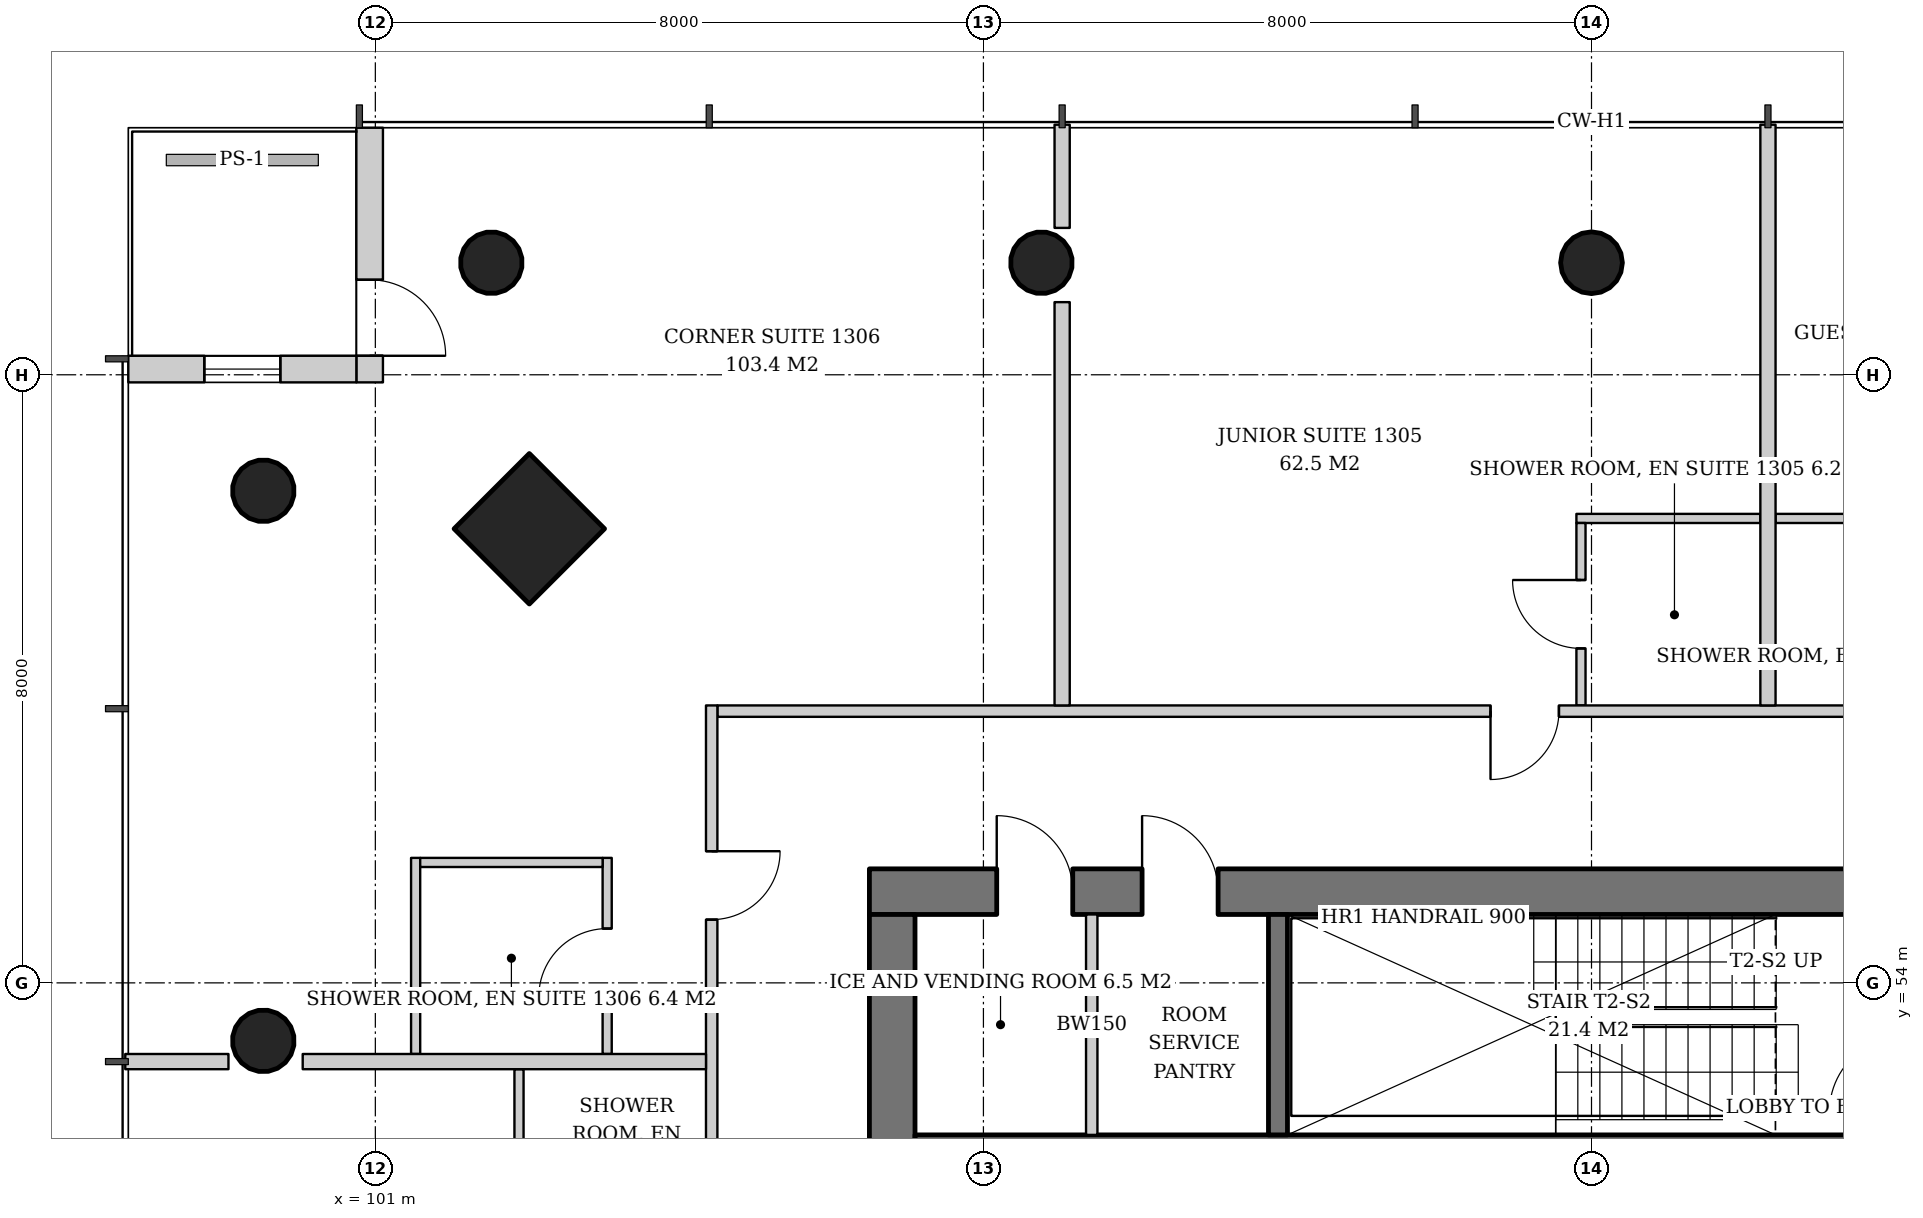
"""IFC4 building model, lengths in metres.
Left out: names, types, materials, properties, quantities, classifications, styles, units other than length and angle.
Written with IfcOpenShell. Run it as: python <this file> out.ifc"""

import sys

from ifc_helpers import new_model, si_unit, direction, frame, frame_2d, origin, origin_2d, place, context, subcontext, project, spatial, rectangle, hollow_circle, extrude, element, fill, save


model = new_model("IFC4")
c1 = context("Model", 3, precision=1e-05, world=origin(), true_north=direction((0.0, 1.0)))
c2 = subcontext(c1, "Body", "Model", "MODEL_VIEW")
j1 = project(units=[si_unit("LENGTHUNIT", "METRE"), si_unit("PLANEANGLEUNIT", "RADIAN")], contexts=[c1])
p1 = place(None, origin())
s1 = spatial("IfcSite", under=j1, at=p1, CompositionType="ELEMENT")
p2 = place(p1, origin())
s2 = spatial("IfcBuilding", under=s1, at=p2, CompositionType="ELEMENT")
p3 = place(p2, frame((0.0, 0.0, 55.2)))
s3 = spatial("IfcBuildingStorey", under=s2, at=p3, CompositionType="ELEMENT", Elevation=55.2)
p4 = place(p3, frame((102.974, 60.026, 0.0), z_axis=(0.043029647111, -0.043029647111, 0.998146732169), x_axis=(0.707106781187, 0.707106781187, 0.0)))
e1 = element("IfcColumn", 1, at=p4, inside=s3, PredefinedType="COLUMN", context=c2, shape_type="SweptSolid", body=[
    extrude(rectangle(XDim=1.4, YDim=1.4, at=origin_2d()), origin(), (0.0, 0.0, 1.0), 3.807),
])
p5 = place(p3, frame((102.474, 63.526, 0.0), z_axis=(0.043029647111, -0.043029647111, 0.998146732169), x_axis=(0.707106781187, 0.707106781187, 0.0)))
e2 = element("IfcColumn", 2, at=p5, inside=s3, PredefinedType="COLUMN", context=c2, shape_type="SweptSolid", body=[
    extrude(hollow_circle(Radius=0.406, WallThickness=0.03, at=origin_2d()), origin(), (0.0, 0.0, 1.0), 3.807),
])
p6 = place(p3, frame((117.0, 63.526, 0.0), z_axis=(0.0, -0.043069538298, 0.999072076915), x_axis=(1.0, 0.0, 0.0)))
e3 = element("IfcColumn", 3, at=p6, inside=s3, PredefinedType="COLUMN", context=c2, shape_type="SweptSolid", body=[
    extrude(hollow_circle(Radius=0.406, WallThickness=0.03, at=origin_2d()), origin(), (0.0, 0.0, 1.0), 3.803),
])
p7 = place(p3, frame((109.737, 63.526, 0.0), z_axis=(0.021497706284, -0.043059584825, 0.998841188968), x_axis=(0.894693706707, 0.446680166538, 0.0)))
e4 = element("IfcColumn", 4, at=p7, inside=s3, PredefinedType="COLUMN", context=c2, shape_type="SweptSolid", body=[
    extrude(hollow_circle(Radius=0.406, WallThickness=0.03, at=origin_2d()), origin(), (0.0, 0.0, 1.0), 3.804),
])
p8 = place(p3, frame((99.474, 60.526, 0.0), z_axis=(0.043029647111, -0.043029647111, 0.998146732169), x_axis=(0.707106781187, 0.707106781187, 0.0)))
e5 = element("IfcColumn", 5, at=p8, inside=s3, PredefinedType="COLUMN", context=c2, shape_type="SweptSolid", body=[
    extrude(hollow_circle(Radius=0.406, WallThickness=0.03, at=origin_2d()), origin(), (0.0, 0.0, 1.0), 3.807),
])
p9 = place(p3, frame((99.474, 53.263, 0.0), z_axis=(0.043059584825, -0.021497706284, 0.998841188968), x_axis=(0.446680166538, 0.894693706707, 0.0)))
e6 = element("IfcColumn", 6, at=p9, inside=s3, PredefinedType="COLUMN", context=c2, shape_type="SweptSolid", body=[
    extrude(hollow_circle(Radius=0.406, WallThickness=0.03, at=origin_2d()), origin(), (0.0, 0.0, 1.0), 3.804),
])
p10 = place(p3, frame((107.5, 55.2, 0.0), z_axis=(0.0, 0.0, 1.0), x_axis=(1.0, 0.0, 0.0)))
e7 = element("IfcWall", 7, at=p10, inside=s3, PredefinedType="SHEAR", context=c2, shape_type="SweptSolid", body=[
    extrude(rectangle(XDim=19.0, YDim=0.6, at=frame_2d((9.5, 0.0))), origin(), (0.0, 0.0, 1.0), 3.8),
])
p11 = place(p10, frame((14.14, 0.0, 0.0)))
e8 = element("IfcOpeningElement", 8, at=p11, cuts=e7, PredefinedType="OPENING", context=c2, shape_type="SweptSolid", body=[
    extrude(rectangle(XDim=1.0, YDim=2.1, at=frame_2d((0.5, 1.05))), frame((0.0, 0.31, 0.0), z_axis=(0.0, -1.0, 0.0), x_axis=(1.0, 0.0, 0.0)), (0.0, 0.0, 1.0), 0.62),
])
p12 = place(p10, frame((1.675, 0.0, 0.0)))
e9 = element("IfcOpeningElement", 9, at=p12, cuts=e7, PredefinedType="OPENING", context=c2, shape_type="SweptSolid", body=[
    extrude(rectangle(XDim=1.0, YDim=2.1, at=frame_2d((0.5, 1.05))), frame((0.0, 0.31, 0.0), z_axis=(0.0, -1.0, 0.0), x_axis=(1.0, 0.0, 0.0)), (0.0, 0.0, 1.0), 0.62),
])
p13 = place(p10, frame((3.587, 0.0, 0.0)))
e10 = element("IfcOpeningElement", 10, at=p13, cuts=e7, PredefinedType="OPENING", context=c2, shape_type="SweptSolid", body=[
    extrude(rectangle(XDim=1.0, YDim=2.1, at=frame_2d((0.5, 1.05))), frame((0.0, 0.31, 0.0), z_axis=(0.0, -1.0, 0.0), x_axis=(1.0, 0.0, 0.0)), (0.0, 0.0, 1.0), 0.62),
])
p14 = place(p3, frame((107.8, 37.1, 0.0), z_axis=(0.0, 0.0, 1.0), x_axis=(0.0, 1.0, 0.0)))
e11 = element("IfcWall", 11, at=p14, inside=s3, PredefinedType="SHEAR", context=c2, shape_type="SweptSolid", body=[
    extrude(rectangle(XDim=17.8, YDim=0.6, at=frame_2d((8.9, 0.0))), origin(), (0.0, 0.0, 1.0), 3.8),
])
p15 = place(p14, frame((8.0, 0.0, 0.0)))
e12 = element("IfcOpeningElement", 12, at=p15, cuts=e11, PredefinedType="OPENING", context=c2, shape_type="SweptSolid", body=[
    extrude(rectangle(XDim=1.8, YDim=2.4, at=frame_2d((0.9, 1.2))), frame((0.0, 0.31, 0.0), z_axis=(0.0, -1.0, 0.0), x_axis=(1.0, 0.0, 0.0)), (0.0, 0.0, 1.0), 0.62),
])
p16 = place(p3, frame((108.1, 51.8, 0.0), z_axis=(0.0, 0.0, 1.0), x_axis=(1.0, 0.0, 0.0)))
e13 = element("IfcWall", 13, at=p16, inside=s3, PredefinedType="SHEAR", context=c2, shape_type="SweptSolid", body=[
    extrude(rectangle(XDim=17.8, YDim=0.4, at=frame_2d((8.9, 0.0))), origin(), (0.0, 0.0, 1.0), 3.8),
])
p17 = place(p3, frame((100.925, 65.25, 0.0), z_axis=(0.0, 0.0, 1.0), x_axis=(0.0, -1.0, 0.0)))
e14 = element("IfcWall", 14, at=p17, inside=s3, PredefinedType="SOLIDWALL", context=c2, shape_type="SweptSolid", body=[
    extrude(rectangle(XDim=3.35, YDim=0.35, at=frame_2d((1.675, 0.0))), origin(), (0.0, 0.0, 1.0), 3.6),
])
p18 = place(p17, frame((2.0, 0.0, 0.0)))
e15 = element("IfcOpeningElement", 15, at=p18, cuts=e14, PredefinedType="OPENING", context=c2, shape_type="SweptSolid", body=[
    extrude(rectangle(XDim=1.0, YDim=2.4, at=frame_2d((0.5, 1.2))), frame((0.0, 0.185, 0.0), z_axis=(0.0, -1.0, 0.0), x_axis=(1.0, 0.0, 0.0)), (0.0, 0.0, 1.0), 0.37),
])
p19 = place(p3, frame((100.75, 62.075, 0.0), z_axis=(0.0, 0.0, 1.0), x_axis=(-1.0, 0.0, 0.0)))
e16 = element("IfcWall", 16, at=p19, inside=s3, PredefinedType="SOLIDWALL", context=c2, shape_type="SweptSolid", body=[
    extrude(rectangle(XDim=3.0, YDim=0.35, at=frame_2d((1.5, 0.0))), origin(), (0.0, 0.0, 1.0), 3.6),
])
p20 = place(p19, frame((1.0, 0.0, 0.9)))
e17 = element("IfcOpeningElement", 17, at=p20, cuts=e16, PredefinedType="OPENING", context=c2, shape_type="SweptSolid", body=[
    extrude(rectangle(XDim=1.0, YDim=2.4, at=frame_2d((0.5, 1.2))), frame((0.0, 0.185, 0.0), z_axis=(0.0, -1.0, 0.0), x_axis=(1.0, 0.0, 0.0)), (0.0, 0.0, 1.0), 0.37),
])
p21 = place(p3, frame((112.875, 52.0, 0.0), z_axis=(0.0, 0.0, 1.0), x_axis=(0.0, 1.0, 0.0)))
e18 = element("IfcWall", 18, at=p21, inside=s3, PredefinedType="SHEAR", context=c2, shape_type="SweptSolid", body=[
    extrude(rectangle(XDim=2.9, YDim=0.25, at=frame_2d((1.45, 0.0))), origin(), (0.0, 0.0, 1.0), 3.8),
])
p22 = place(p3, frame((110.425, 52.0, 0.0), z_axis=(0.0, 0.0, 1.0), x_axis=(0.0, 1.0, 0.0)))
e19 = element("IfcWall", 19, at=p22, inside=s3, PredefinedType="SOLIDWALL", context=c2, shape_type="SweptSolid", body=[
    extrude(rectangle(XDim=2.9, YDim=0.15, at=frame_2d((1.45, 0.0))), origin(), (0.0, 0.0, 1.0), 3.6),
])
for number, where, z_axis, x_axis in (
    (20, (121.841, 60.11, 0.0), (0.0, 0.0, 1.0), (-1.0, 0.0, 0.0)),
    (21, (119.221, 60.11, 0.0), (0.0, 0.0, 1.0), (-1.0, 0.0, 0.0)),
):
    element("IfcWall", number, at=place(p3, frame(where, z_axis=z_axis, x_axis=x_axis)), inside=s3, PredefinedType="PARTITIONING", context=c2, shape_type="SweptSolid", body=[
        extrude(rectangle(XDim=2.42, YDim=0.12, at=frame_2d((1.21, 0.0))), origin(), (0.0, 0.0, 1.0), 2.847),
    ])
p23 = place(p3, frame((116.861, 57.65, 0.0), z_axis=(0.0, 0.0, 1.0), x_axis=(0.0, 1.0, 0.0)))
e22 = element("IfcWall", 22, at=p23, inside=s3, PredefinedType="PARTITIONING", context=c2, shape_type="SweptSolid", body=[
    extrude(rectangle(XDim=2.4, YDim=0.12, at=frame_2d((1.2, 0.0))), origin(), (0.0, 0.0, 1.0), 3.6),
])
p24 = place(p23, frame((0.75, 0.0, 0.0)))
e23 = element("IfcOpeningElement", 23, at=p24, cuts=e22, PredefinedType="OPENING", context=c2, shape_type="SweptSolid", body=[
    extrude(rectangle(XDim=0.9, YDim=2.1, at=frame_2d((0.45, 1.05))), frame((0.0, 0.07, 0.0), z_axis=(0.0, -1.0, 0.0), x_axis=(1.0, 0.0, 0.0)), (0.0, 0.0, 1.0), 0.14),
])
p25 = place(p3, frame((128.65, 57.575, 0.0), z_axis=(0.0, 0.0, 1.0), x_axis=(-1.0, 0.0, 0.0)))
e24 = element("IfcWall", 24, at=p25, inside=s3, PredefinedType="PARTITIONING", context=c2, shape_type="SweptSolid", body=[
    extrude(rectangle(XDim=23.15, YDim=0.15, at=frame_2d((11.575, 0.0))), origin(), (0.0, 0.0, 1.0), 2.8),
])
p26 = place(p25, frame((1.918, 0.0, 0.0)))
e25 = element("IfcOpeningElement", 25, at=p26, cuts=e24, PredefinedType="OPENING", context=c2, shape_type="SweptSolid", body=[
    extrude(rectangle(XDim=0.9, YDim=2.1, at=frame_2d((0.45, 1.05))), frame((0.0, 0.085, 0.0), z_axis=(0.0, -1.0, 0.0), x_axis=(1.0, 0.0, 0.0)), (0.0, 0.0, 1.0), 0.17),
])
p27 = place(p25, frame((5.678, 0.0, 0.0)))
e26 = element("IfcOpeningElement", 26, at=p27, cuts=e24, PredefinedType="OPENING", context=c2, shape_type="SweptSolid", body=[
    extrude(rectangle(XDim=0.9, YDim=2.1, at=frame_2d((0.45, 1.05))), frame((0.0, 0.085, 0.0), z_axis=(0.0, -1.0, 0.0), x_axis=(1.0, 0.0, 0.0)), (0.0, 0.0, 1.0), 0.17),
])
p28 = place(p25, frame((12.079, 0.0, 0.0)))
e27 = element("IfcOpeningElement", 27, at=p28, cuts=e24, PredefinedType="OPENING", context=c2, shape_type="SweptSolid", body=[
    extrude(rectangle(XDim=0.9, YDim=2.1, at=frame_2d((0.45, 1.05))), frame((0.0, 0.085, 0.0), z_axis=(0.0, -1.0, 0.0), x_axis=(1.0, 0.0, 0.0)), (0.0, 0.0, 1.0), 0.17),
])
p29 = place(p3, frame((119.322, 57.65, 0.0), z_axis=(0.0, 0.0, 1.0), x_axis=(0.0, 1.0, 0.0)))
e28 = element("IfcWall", 28, at=p29, inside=s3, PredefinedType="PARTITIONING", context=c2, shape_type="SweptSolid", body=[
    extrude(rectangle(XDim=7.64, YDim=0.2, at=frame_2d((3.82, 0.0))), origin(), (0.0, 0.0, 1.0), 3.05),
])
p30 = place(p3, frame((110.036, 57.65, 0.0), z_axis=(0.0, 0.0, 1.0), x_axis=(0.0, 1.0, 0.0)))
e29 = element("IfcWall", 29, at=p30, inside=s3, PredefinedType="PARTITIONING", context=c2, shape_type="SweptSolid", body=[
    extrude(rectangle(XDim=5.306, YDim=0.2, at=frame_2d((2.653, 0.0))), origin(), (0.0, 0.0, 1.0), 3.6),
])
p31 = place(p3, frame((110.036, 63.932, 0.0), z_axis=(0.0, 0.0, 1.0), x_axis=(0.0, 1.0, 0.0)))
e30 = element("IfcWall", 30, at=p31, inside=s3, PredefinedType="PARTITIONING", context=c2, shape_type="SweptSolid", body=[
    extrude(rectangle(XDim=1.358, YDim=0.2, at=frame_2d((0.679, 0.0))), origin(), (0.0, 0.0, 1.0), 3.6),
])
p32 = place(p3, frame((104.05, 53.064, 0.0), z_axis=(0.0, 0.0, 1.0), x_axis=(0.0, 1.0, 0.0)))
e31 = element("IfcWall", 31, at=p32, inside=s3, PredefinedType="PARTITIONING", context=c2, shape_type="SweptSolid", body=[
    extrude(rectangle(XDim=2.58, YDim=0.12, at=frame_2d((1.29, 0.0))), origin(), (0.0, 0.0, 1.0), 2.8),
])
p33 = place(p32, frame((0.75, 0.0, 0.0)))
e32 = element("IfcOpeningElement", 32, at=p33, cuts=e31, PredefinedType="OPENING", context=c2, shape_type="SweptSolid", body=[
    extrude(rectangle(XDim=0.9, YDim=2.1, at=frame_2d((0.45, 1.05))), frame((0.0, 0.07, 0.0), z_axis=(0.0, -1.0, 0.0), x_axis=(1.0, 0.0, 0.0)), (0.0, 0.0, 1.0), 0.14),
])
p34 = place(p3, frame((101.53, 53.064, 0.0), z_axis=(0.0, 0.0, 1.0), x_axis=(0.0, 1.0, 0.0)))
e33 = element("IfcWall", 33, at=p34, inside=s3, PredefinedType="PARTITIONING", context=c2, shape_type="SweptSolid", body=[
    extrude(rectangle(XDim=2.58, YDim=0.12, at=frame_2d((1.29, 0.0))), origin(), (0.0, 0.0, 1.0), 2.8),
])
p35 = place(p3, frame((103.99, 55.584, 0.0), z_axis=(0.0, 0.0, 1.0), x_axis=(-1.0, 0.0, 0.0)))
e34 = element("IfcWall", 34, at=p35, inside=s3, PredefinedType="PARTITIONING", context=c2, shape_type="SweptSolid", body=[
    extrude(rectangle(XDim=2.4, YDim=0.12, at=frame_2d((1.2, 0.0))), origin(), (0.0, 0.0, 1.0), 2.847),
])
p36 = place(p3, frame((102.89, 52.864, 0.0), z_axis=(0.0, 0.0, 1.0), x_axis=(0.0, -1.0, 0.0)))
e35 = element("IfcWall", 35, at=p36, inside=s3, PredefinedType="PARTITIONING", context=c2, shape_type="SweptSolid", body=[
    extrude(rectangle(XDim=2.42, YDim=0.12, at=frame_2d((1.21, 0.0))), origin(), (0.0, 0.0, 1.0), 2.847),
])
p37 = place(p3, frame((105.425, 57.65, 0.0), z_axis=(0.0, 0.0, 1.0), x_axis=(0.0, -1.0, 0.0)))
e36 = element("IfcWall", 36, at=p37, inside=s3, PredefinedType="PARTITIONING", context=c2, shape_type="SweptSolid", body=[
    extrude(rectangle(XDim=23.15, YDim=0.15, at=frame_2d((11.575, 0.0))), origin(), (0.0, 0.0, 1.0), 2.8),
])
p38 = place(p37, frame((1.918, 0.0, 0.0)))
e37 = element("IfcOpeningElement", 37, at=p38, cuts=e36, PredefinedType="OPENING", context=c2, shape_type="SweptSolid", body=[
    extrude(rectangle(XDim=0.9, YDim=2.1, at=frame_2d((0.45, 1.05))), frame((0.0, 0.085, 0.0), z_axis=(0.0, -1.0, 0.0), x_axis=(1.0, 0.0, 0.0)), (0.0, 0.0, 1.0), 0.17),
])
p39 = place(p37, frame((7.436, 0.0, 0.0)))
e38 = element("IfcOpeningElement", 38, at=p39, cuts=e36, PredefinedType="OPENING", context=c2, shape_type="SweptSolid", body=[
    extrude(rectangle(XDim=0.9, YDim=2.1, at=frame_2d((0.45, 1.05))), frame((0.0, 0.085, 0.0), z_axis=(0.0, -1.0, 0.0), x_axis=(1.0, 0.0, 0.0)), (0.0, 0.0, 1.0), 0.17),
])
p40 = place(p37, frame((16.671, 0.0, 0.0)))
e39 = element("IfcOpeningElement", 39, at=p40, cuts=e36, PredefinedType="OPENING", context=c2, shape_type="SweptSolid", body=[
    extrude(rectangle(XDim=1.0, YDim=2.1, at=frame_2d((0.5, 1.05))), frame((0.0, 0.085, 0.0), z_axis=(0.0, -1.0, 0.0), x_axis=(1.0, 0.0, 0.0)), (0.0, 0.0, 1.0), 0.17),
])
p41 = place(p3, frame((105.35, 52.964, 0.0), z_axis=(0.0, 0.0, 1.0), x_axis=(-1.0, 0.0, 0.0)))
e40 = element("IfcWall", 40, at=p41, inside=s3, PredefinedType="PARTITIONING", context=c2, shape_type="SweptSolid", body=[
    extrude(rectangle(XDim=5.306, YDim=0.2, at=frame_2d((2.653, 0.0))), origin(), (0.0, 0.0, 1.0), 3.6),
])
p42 = place(p3, frame((99.068, 52.964, 0.0), z_axis=(0.0, 0.0, 1.0), x_axis=(-1.0, 0.0, 0.0)))
e41 = element("IfcWall", 41, at=p42, inside=s3, PredefinedType="PARTITIONING", context=c2, shape_type="SweptSolid", body=[
    extrude(rectangle(XDim=1.358, YDim=0.2, at=frame_2d((0.679, 0.0))), origin(), (0.0, 0.0, 1.0), 3.6),
])
p43 = place(p18, origin())
e42 = element("IfcDoor", 42, at=p43, inside=s3, OperationType="SINGLE_SWING_RIGHT", PredefinedType="DOOR", context=c2, shape_type="SweptSolid", body=[
    extrude(rectangle(XDim=1.0, YDim=2.4, at=frame_2d((0.5, 1.2))), frame((0.0, 0.025, 0.0), z_axis=(0.0, -1.0, 0.0), x_axis=(1.0, 0.0, 0.0)), (0.0, 0.0, 1.0), 0.05),
])
fill(e15, e42)
p44 = place(p20, origin())
e43 = element("IfcWindow", 43, at=p44, inside=s3, PartitioningType="SINGLE_PANEL", PredefinedType="WINDOW", context=c2, shape_type="SweptSolid", body=[
    extrude(rectangle(XDim=1.0, YDim=2.4, at=frame_2d((0.5, 1.2))), frame((0.0, 0.03, 0.0), z_axis=(0.0, -1.0, 0.0), x_axis=(1.0, 0.0, 0.0)), (0.0, 0.0, 1.0), 0.06),
])
fill(e17, e43)
p45 = place(p12, origin())
e44 = element("IfcDoor", 44, at=p45, inside=s3, OperationType="SINGLE_SWING_LEFT", PredefinedType="DOOR", context=c2, shape_type="SweptSolid", body=[
    extrude(rectangle(XDim=1.0, YDim=2.1, at=frame_2d((0.5, 1.05))), frame((0.0, -0.24, 0.0), z_axis=(0.0, -1.0, 0.0), x_axis=(1.0, 0.0, 0.0)), (0.0, 0.0, 1.0), 0.05),
])
fill(e9, e44)
p46 = place(p13, origin())
e45 = element("IfcDoor", 45, at=p46, inside=s3, OperationType="SINGLE_SWING_LEFT", PredefinedType="DOOR", context=c2, shape_type="SweptSolid", body=[
    extrude(rectangle(XDim=1.0, YDim=2.1, at=frame_2d((0.5, 1.05))), frame((0.0, -0.24, 0.0), z_axis=(0.0, -1.0, 0.0), x_axis=(1.0, 0.0, 0.0)), (0.0, 0.0, 1.0), 0.05),
])
fill(e10, e45)
p47 = place(p24, origin())
e46 = element("IfcDoor", 46, at=p47, inside=s3, OperationType="SINGLE_SWING_RIGHT", PredefinedType="DOOR", context=c2, shape_type="SweptSolid", body=[
    extrude(rectangle(XDim=0.9, YDim=2.1, at=frame_2d((0.45, 1.05))), frame((0.0, 0.025, 0.0), z_axis=(0.0, -1.0, 0.0), x_axis=(1.0, 0.0, 0.0)), (0.0, 0.0, 1.0), 0.05),
])
fill(e23, e46)
p48 = place(p28, origin())
e47 = element("IfcDoor", 47, at=p48, inside=s3, OperationType="SINGLE_SWING_RIGHT", PredefinedType="DOOR", context=c2, shape_type="SweptSolid", body=[
    extrude(rectangle(XDim=0.9, YDim=2.1, at=frame_2d((0.45, 1.05))), frame((0.0, 0.025, 0.0), z_axis=(0.0, -1.0, 0.0), x_axis=(1.0, 0.0, 0.0)), (0.0, 0.0, 1.0), 0.05),
])
fill(e27, e47)
p49 = place(p33, origin())
e48 = element("IfcDoor", 48, at=p49, inside=s3, OperationType="SINGLE_SWING_LEFT", PredefinedType="DOOR", context=c2, shape_type="SweptSolid", body=[
    extrude(rectangle(XDim=0.9, YDim=2.1, at=frame_2d((0.45, 1.05))), frame((0.0, 0.025, 0.0), z_axis=(0.0, -1.0, 0.0), x_axis=(1.0, 0.0, 0.0)), (0.0, 0.0, 1.0), 0.05),
])
fill(e32, e48)
p50 = place(p38, origin())
e49 = element("IfcDoor", 49, at=p50, inside=s3, OperationType="SINGLE_SWING_LEFT", PredefinedType="DOOR", context=c2, shape_type="SweptSolid", body=[
    extrude(rectangle(XDim=0.9, YDim=2.1, at=frame_2d((0.45, 1.05))), frame((0.0, 0.025, 0.0), z_axis=(0.0, -1.0, 0.0), x_axis=(1.0, 0.0, 0.0)), (0.0, 0.0, 1.0), 0.05),
])
fill(e37, e49)
save(model, sys.argv[1])
